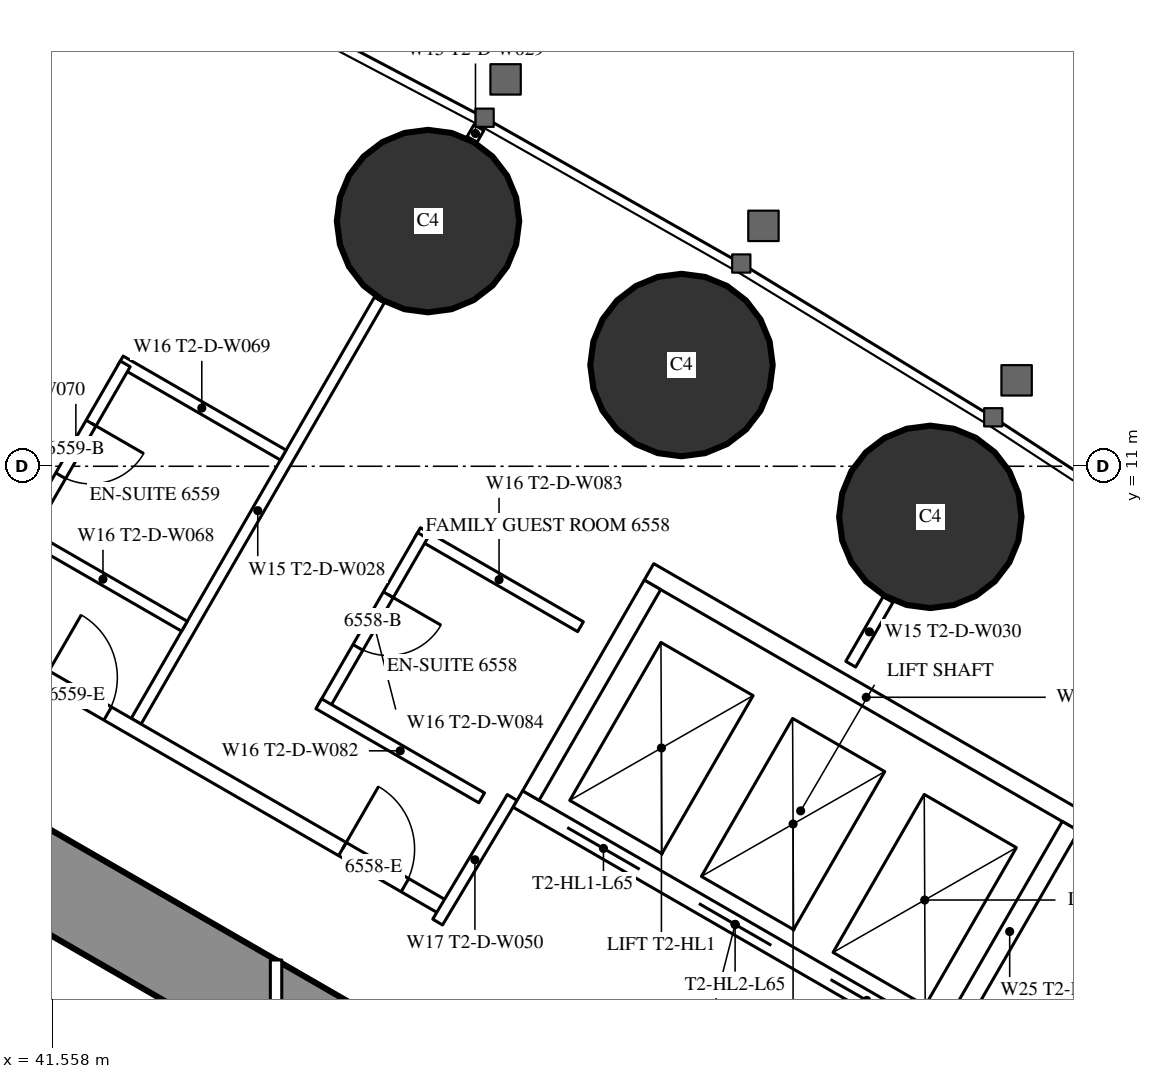
"""IFC4 building model, lengths in metres.
Left out: names, types, materials, properties, quantities, classifications, styles, units other than length and angle.
Written with IfcOpenShell. Run it as: python <this file> out.ifc"""

import sys

from ifc_helpers import new_model, si_unit, direction, frame, frame_2d, origin, origin_2d, place, context, subcontext, project, spatial, rectangle, circle, extrude, element, fill, save


model = new_model("IFC4")
c1 = context("Model", 3, precision=1e-05, world=origin(), true_north=direction((0.0, 1.0)))
c2 = subcontext(c1, "Body", "Model", "MODEL_VIEW")
j1 = project(units=[si_unit("LENGTHUNIT", "METRE"), si_unit("PLANEANGLEUNIT", "RADIAN")], contexts=[c1])
p1 = place(None, origin())
s1 = spatial("IfcSite", under=j1, at=p1, CompositionType="ELEMENT")
p2 = place(p1, origin())
s2 = spatial("IfcBuilding", under=s1, at=p2, CompositionType="ELEMENT")
p3 = place(p2, frame((0.0, 0.0, 244.1)))
s3 = spatial("IfcBuildingStorey", under=s2, at=p3, CompositionType="ELEMENT", Elevation=244.1)
for number, where, z_axis, x_axis in (
    (1, (53.108, 10.334, 0.0), (0.0, 0.0, 1.0), (1.0, 0.0, 0.0)),
    (2, (49.834, 12.332, 0.0), (0.0, 0.0, 1.0), (1.0, 0.0, 0.0)),
    (3, (46.499, 14.226, 0.0), (0.0, 0.0, 1.0), (1.0, 0.0, 0.0)),
):
    element("IfcColumn", number, at=place(p3, frame(where, z_axis=z_axis, x_axis=x_axis)), inside=s3, PredefinedType="COLUMN", context=c2, shape_type="SweptSolid", body=[
        extrude(circle(Radius=1.2, at=origin_2d()), origin(), (0.0, 0.0, 1.0), 3.6),
    ])
p4 = place(p3, frame((27.2, 13.8, 0.0), z_axis=(0.0, 0.0, 1.0), x_axis=(0.866024515034, -0.500001539357, 0.0)))
e4 = element("IfcWall", 4, at=p4, inside=s3, PredefinedType="SHEAR", context=c2, shape_type="SweptSolid", body=[
    extrude(rectangle(XDim=26.907, YDim=1.2, at=frame_2d((13.454, 0.0))), origin(), (0.0, 0.0, 1.0), 3.6),
])
p5 = place(p4, frame((4.6, 0.0, 0.0)))
e5 = element("IfcOpeningElement", 5, at=p5, cuts=e4, PredefinedType="OPENING", context=c2, shape_type="SweptSolid", body=[
    extrude(rectangle(XDim=1.0, YDim=2.2, at=frame_2d((0.5, 1.1))), frame((0.0, 0.61, 0.0), z_axis=(0.0, -1.0, 0.0), x_axis=(1.0, 0.0, 0.0)), (0.0, 0.0, 1.0), 1.22),
])
p6 = place(p4, frame((13.395, 0.0, 0.0)))
e6 = element("IfcOpeningElement", 6, at=p6, cuts=e4, PredefinedType="OPENING", context=c2, shape_type="SweptSolid", body=[
    extrude(rectangle(XDim=1.8, YDim=2.2, at=frame_2d((0.9, 1.1))), frame((0.0, 0.61, 0.0), z_axis=(0.0, -1.0, 0.0), x_axis=(1.0, 0.0, 0.0)), (0.0, 0.0, 1.0), 1.22),
])
p7 = place(p3, frame((42.66, 7.646, 0.0), z_axis=(0.0, 0.0, 1.0), x_axis=(0.499996592859, 0.866027370889, 0.0)))
e7 = element("IfcWall", 7, at=p7, inside=s3, PredefinedType="PARTITIONING", context=c2, shape_type="SweptSolid", body=[
    extrude(rectangle(XDim=6.398, YDim=0.15, at=frame_2d((3.199, 0.0))), origin(), (0.0, 0.0, 1.0), 2.45),
])
p8 = place(p3, frame((47.079, 15.3, 0.0), z_axis=(0.0, 0.0, 1.0), x_axis=(0.499212083968, 0.866479829667, 0.0)))
e8 = element("IfcWall", 8, at=p8, inside=s3, PredefinedType="PARTITIONING", context=c2, shape_type="SweptSolid", body=[
    extrude(rectangle(XDim=0.179, YDim=0.15, at=frame_2d((0.09, 0.0))), origin(), (0.0, 0.0, 1.0), 2.45),
])
p9 = place(p3, frame((52.06, 8.396, 0.0), z_axis=(0.0, 0.0, 1.0), x_axis=(0.500095379624, 0.865970329329, 0.0)))
e9 = element("IfcWall", 9, at=p9, inside=s3, PredefinedType="PARTITIONING", context=c2, shape_type="SweptSolid", body=[
    extrude(rectangle(XDim=0.982, YDim=0.15, at=frame_2d((0.491, 0.0))), origin(), (0.0, 0.0, 1.0), 3.35),
])
p10 = place(p3, frame((28.959, 15.44, 0.0), z_axis=(0.0, 0.0, 1.0), x_axis=(0.866028936079, -0.499993881836, 0.0)))
e10 = element("IfcWall", 10, at=p10, inside=s3, PredefinedType="PARTITIONING", context=c2, shape_type="SweptSolid", body=[
    extrude(rectangle(XDim=20.503, YDim=0.2, at=frame_2d((10.251, 0.0))), origin(), (0.0, 0.0, 1.0), 3.35),
])
p11 = place(p10, frame((18.953, 0.0, 0.0)))
e11 = element("IfcOpeningElement", 11, at=p11, cuts=e10, PredefinedType="OPENING", context=c2, shape_type="SweptSolid", body=[
    extrude(rectangle(XDim=0.95, YDim=2.2, at=frame_2d((0.475, 1.1))), frame((0.0, 0.11, 0.0), z_axis=(0.0, -1.0, 0.0), x_axis=(1.0, 0.0, 0.0)), (0.0, 0.0, 1.0), 0.22),
])
p12 = place(p10, frame((14.437, 0.0, 0.0)))
e12 = element("IfcOpeningElement", 12, at=p12, cuts=e10, PredefinedType="OPENING", context=c2, shape_type="SweptSolid", body=[
    extrude(rectangle(XDim=0.95, YDim=2.2, at=frame_2d((0.475, 1.1))), frame((0.0, 0.11, 0.0), z_axis=(0.0, -1.0, 0.0), x_axis=(1.0, 0.0, 0.0)), (0.0, 0.0, 1.0), 0.22),
])
p13 = place(p10, frame((2.244, 0.0, 0.0)))
e13 = element("IfcOpeningElement", 13, at=p13, cuts=e10, PredefinedType="OPENING", context=c2, shape_type="SweptSolid", body=[
    extrude(rectangle(XDim=1.8, YDim=2.04, at=frame_2d((0.9, 1.02))), frame((0.0, 0.11, 0.0), z_axis=(0.0, -1.0, 0.0), x_axis=(1.0, 0.0, 0.0)), (0.0, 0.0, 1.0), 0.22),
])
p14 = place(p3, frame((47.606, 6.642, 0.0), z_axis=(0.0, 0.0, 1.0), x_axis=(-0.51353662755, -0.858067673418, 0.0)))
e14 = element("IfcWall", 14, at=p14, inside=s3, PredefinedType="PARTITIONING", context=c2, shape_type="SweptSolid", body=[
    extrude(rectangle(XDim=1.91, YDim=0.15, at=frame_2d((0.955, 0.0))), origin(), (0.0, 0.0, 1.0), 3.35),
])
p15 = place(p3, frame((46.362, 10.127, 0.0), z_axis=(0.0, 0.0, 1.0), x_axis=(0.866006523861, -0.500032699561, 0.0)))
e15 = element("IfcWall", 15, at=p15, inside=s3, PredefinedType="PARTITIONING", context=c2, shape_type="SweptSolid", body=[
    extrude(rectangle(XDim=2.475, YDim=0.15, at=frame_2d((1.237, 0.0))), origin(), (0.0, 0.0, 1.0), 3.35),
])
p16 = place(p3, frame((45.127, 7.838, 0.0), z_axis=(0.0, 0.0, 1.0), x_axis=(0.500006934395, 0.866021400173, 0.0)))
e16 = element("IfcWall", 16, at=p16, inside=s3, PredefinedType="PARTITIONING", context=c2, shape_type="SweptSolid", body=[
    extrude(rectangle(XDim=2.6, YDim=0.15, at=frame_2d((1.3, 0.0))), origin(), (0.0, 0.0, 1.0), 3.35),
])
p17 = place(p16, frame((0.9, 0.0, 0.0)))
e17 = element("IfcOpeningElement", 17, at=p17, cuts=e16, PredefinedType="OPENING", context=c2, shape_type="SweptSolid", body=[
    extrude(rectangle(XDim=0.8, YDim=2.2, at=frame_2d((0.4, 1.1))), frame((0.0, 0.085, 0.0), z_axis=(0.0, -1.0, 0.0), x_axis=(1.0, 0.0, 0.0)), (0.0, 0.0, 1.0), 0.17),
])
p18 = place(p3, frame((45.062, 7.875, 0.0), z_axis=(0.0, 0.0, 1.0), x_axis=(0.866031185235, -0.4999899861, 0.0)))
e18 = element("IfcWall", 18, at=p18, inside=s3, PredefinedType="PARTITIONING", context=c2, shape_type="SweptSolid", body=[
    extrude(rectangle(XDim=2.475, YDim=0.15, at=frame_2d((1.238, 0.0))), origin(), (0.0, 0.0, 1.0), 2.5),
])
p19 = place(p3, frame((42.451, 12.385, 0.0), z_axis=(0.0, 0.0, 1.0), x_axis=(0.866031185235, -0.4999899861, 0.0)))
e19 = element("IfcWall", 19, at=p19, inside=s3, PredefinedType="PARTITIONING", context=c2, shape_type="SweptSolid", body=[
    extrude(rectangle(XDim=2.475, YDim=0.15, at=frame_2d((1.238, 0.0))), origin(), (0.0, 0.0, 1.0), 3.35),
])
p20 = place(p3, frame((41.216, 10.095, 0.0), z_axis=(0.0, 0.0, 1.0), x_axis=(0.499936506574, 0.866062058628, 0.0)))
e20 = element("IfcWall", 20, at=p20, inside=s3, PredefinedType="PARTITIONING", context=c2, shape_type="SweptSolid", body=[
    extrude(rectangle(XDim=2.6, YDim=0.15, at=frame_2d((1.3, 0.0))), origin(), (0.0, 0.0, 1.0), 3.35),
])
p21 = place(p20, frame((0.9, 0.0, 0.0)))
e21 = element("IfcOpeningElement", 21, at=p21, cuts=e20, PredefinedType="OPENING", context=c2, shape_type="SweptSolid", body=[
    extrude(rectangle(XDim=0.8, YDim=2.2, at=frame_2d((0.4, 1.1))), frame((0.0, 0.085, 0.0), z_axis=(0.0, -1.0, 0.0), x_axis=(1.0, 0.0, 0.0)), (0.0, 0.0, 1.0), 0.17),
])
p22 = place(p3, frame((41.151, 10.133, 0.0), z_axis=(0.0, 0.0, 1.0), x_axis=(0.866006523861, -0.500032699561, 0.0)))
e22 = element("IfcWall", 22, at=p22, inside=s3, PredefinedType="PARTITIONING", context=c2, shape_type="SweptSolid", body=[
    extrude(rectangle(XDim=2.475, YDim=0.15, at=frame_2d((1.237, 0.0))), origin(), (0.0, 0.0, 1.0), 2.5),
])
p23 = place(p3, frame((44.5, -4.505, 0.0), z_axis=(0.0, 0.0, 1.0), x_axis=(0.0, 1.0, 0.0)))
e23 = element("IfcWall", 23, at=p23, inside=s3, PredefinedType="PARTITIONING", context=c2, shape_type="SweptSolid", body=[
    extrude(rectangle(XDim=9.009, YDim=0.15, at=frame_2d((4.505, 0.0))), origin(), (0.0, 0.0, 1.0), 3.35),
])
p24 = place(p23, frame((1.752, 0.0, 0.0)))
e24 = element("IfcOpeningElement", 24, at=p24, cuts=e23, PredefinedType="OPENING", context=c2, shape_type="SweptSolid", body=[
    extrude(rectangle(XDim=1.0, YDim=2.2, at=frame_2d((0.5, 1.1))), frame((0.0, 0.085, 0.0), z_axis=(0.0, -1.0, 0.0), x_axis=(1.0, 0.0, 0.0)), (0.0, 0.0, 1.0), 0.17),
])
p25 = place(p23, frame((6.257, 0.0, 0.0)))
e25 = element("IfcOpeningElement", 25, at=p25, cuts=e23, PredefinedType="OPENING", context=c2, shape_type="SweptSolid", body=[
    extrude(rectangle(XDim=1.0, YDim=2.2, at=frame_2d((0.5, 1.1))), frame((0.0, 0.085, 0.0), z_axis=(0.0, -1.0, 0.0), x_axis=(1.0, 0.0, 0.0)), (0.0, 0.0, 1.0), 0.17),
])
p26 = place(p3, frame((47.681, 6.622, 0.0), z_axis=(0.0, 0.0, 1.0), x_axis=(0.86603344179, -0.499986077507, 0.0)))
e26 = element("IfcWall", 26, at=p26, inside=s3, PredefinedType="PARTITIONING", context=c2, shape_type="SweptSolid", body=[
    extrude(rectangle(XDim=6.6, YDim=0.25, at=frame_2d((3.3, 0.0))), origin(), (0.0, 0.0, 1.0), 3.35),
])
p27 = place(p26, frame((0.75, 0.0, 0.0)))
e27 = element("IfcOpeningElement", 27, at=p27, cuts=e26, PredefinedType="OPENING", context=c2, shape_type="SweptSolid", body=[
    extrude(rectangle(XDim=1.1, YDim=2.2, at=frame_2d((0.55, 1.1))), frame((0.0, 0.135, 0.0), z_axis=(0.0, -1.0, 0.0), x_axis=(1.0, 0.0, 0.0)), (0.0, 0.0, 1.0), 0.27),
])
p28 = place(p26, frame((2.75, 0.0, 0.0)))
e28 = element("IfcOpeningElement", 28, at=p28, cuts=e26, PredefinedType="OPENING", context=c2, shape_type="SweptSolid", body=[
    extrude(rectangle(XDim=1.1, YDim=2.2, at=frame_2d((0.55, 1.1))), frame((0.0, 0.135, 0.0), z_axis=(0.0, -1.0, 0.0), x_axis=(1.0, 0.0, 0.0)), (0.0, 0.0, 1.0), 0.27),
])
p29 = place(p26, frame((4.75, 0.0, 0.0)))
e29 = element("IfcOpeningElement", 29, at=p29, cuts=e26, PredefinedType="OPENING", context=c2, shape_type="SweptSolid", body=[
    extrude(rectangle(XDim=1.1, YDim=2.2, at=frame_2d((0.55, 1.1))), frame((0.0, 0.135, 0.0), z_axis=(0.0, -1.0, 0.0), x_axis=(1.0, 0.0, 0.0)), (0.0, 0.0, 1.0), 0.27),
])
p30 = place(p3, frame((49.406, 9.611, 0.0), z_axis=(0.0, 0.0, 1.0), x_axis=(0.86603344179, -0.499986077507, 0.0)))
e30 = element("IfcWall", 30, at=p30, inside=s3, PredefinedType="PARTITIONING", context=c2, shape_type="SweptSolid", body=[
    extrude(rectangle(XDim=6.6, YDim=0.25, at=frame_2d((3.3, 0.0))), origin(), (0.0, 0.0, 1.0), 3.35),
])
p31 = place(p3, frame((47.852, 6.668, 0.0), z_axis=(0.0, 0.0, 1.0), x_axis=(0.499929347863, 0.866066190972, 0.0)))
e31 = element("IfcWall", 31, at=p31, inside=s3, PredefinedType="PARTITIONING", context=c2, shape_type="SweptSolid", body=[
    extrude(rectangle(XDim=3.201, YDim=0.25, at=frame_2d((1.6, 0.0))), origin(), (0.0, 0.0, 1.0), 3.35),
])
p32 = place(p3, frame((53.352, 3.493, 0.0), z_axis=(0.0, 0.0, 1.0), x_axis=(0.499872130319, 0.866099216793, 0.0)))
e32 = element("IfcWall", 32, at=p32, inside=s3, PredefinedType="PARTITIONING", context=c2, shape_type="SweptSolid", body=[
    extrude(rectangle(XDim=3.2, YDim=0.25, at=frame_2d((1.6, 0.0))), origin(), (0.0, 0.0, 1.0), 3.35),
])
p33 = place(p17, origin())
e33 = element("IfcDoor", 33, at=p33, inside=s3, OperationType="SINGLE_SWING_RIGHT", PredefinedType="DOOR", context=c2, shape_type="SweptSolid", body=[
    extrude(rectangle(XDim=0.8, YDim=2.2, at=frame_2d((0.4, 1.1))), frame((0.0, 0.025, 0.0), z_axis=(0.0, -1.0, 0.0), x_axis=(1.0, 0.0, 0.0)), (0.0, 0.0, 1.0), 0.05),
])
fill(e17, e33)
p34 = place(p11, origin())
e34 = element("IfcDoor", 34, at=p34, inside=s3, OperationType="SINGLE_SWING_LEFT", PredefinedType="DOOR", context=c2, shape_type="SweptSolid", body=[
    extrude(rectangle(XDim=0.95, YDim=2.2, at=frame_2d((0.475, 1.1))), frame((0.0, 0.025, 0.0), z_axis=(0.0, -1.0, 0.0), x_axis=(1.0, 0.0, 0.0)), (0.0, 0.0, 1.0), 0.05),
])
fill(e11, e34)
p35 = place(p21, origin())
e35 = element("IfcDoor", 35, at=p35, inside=s3, OperationType="SINGLE_SWING_RIGHT", PredefinedType="DOOR", context=c2, shape_type="SweptSolid", body=[
    extrude(rectangle(XDim=0.8, YDim=2.2, at=frame_2d((0.4, 1.1))), frame((0.0, 0.025, 0.0), z_axis=(0.0, -1.0, 0.0), x_axis=(1.0, 0.0, 0.0)), (0.0, 0.0, 1.0), 0.05),
])
fill(e21, e35)
p36 = place(p12, origin())
e36 = element("IfcDoor", 36, at=p36, inside=s3, OperationType="SINGLE_SWING_LEFT", PredefinedType="DOOR", context=c2, shape_type="SweptSolid", body=[
    extrude(rectangle(XDim=0.95, YDim=2.2, at=frame_2d((0.475, 1.1))), frame((0.0, 0.025, 0.0), z_axis=(0.0, -1.0, 0.0), x_axis=(1.0, 0.0, 0.0)), (0.0, 0.0, 1.0), 0.05),
])
fill(e12, e36)
p37 = place(p27, origin())
e37 = element("IfcDoor", 37, at=p37, inside=s3, OperationType="DOUBLE_DOOR_SLIDING", PredefinedType="USERDEFINED", context=c2, shape_type="SweptSolid", body=[
    extrude(rectangle(XDim=1.1, YDim=2.2, at=frame_2d((0.55, 1.1))), frame((0.0, 0.025, 0.0), z_axis=(0.0, -1.0, 0.0), x_axis=(1.0, 0.0, 0.0)), (0.0, 0.0, 1.0), 0.05),
])
fill(e27, e37)
p38 = place(p28, origin())
e38 = element("IfcDoor", 38, at=p38, inside=s3, OperationType="DOUBLE_DOOR_SLIDING", PredefinedType="USERDEFINED", context=c2, shape_type="SweptSolid", body=[
    extrude(rectangle(XDim=1.1, YDim=2.2, at=frame_2d((0.55, 1.1))), frame((0.0, 0.025, 0.0), z_axis=(0.0, -1.0, 0.0), x_axis=(1.0, 0.0, 0.0)), (0.0, 0.0, 1.0), 0.05),
])
fill(e28, e38)
p39 = place(p29, origin())
e39 = element("IfcDoor", 39, at=p39, inside=s3, OperationType="DOUBLE_DOOR_SLIDING", PredefinedType="USERDEFINED", context=c2, shape_type="SweptSolid", body=[
    extrude(rectangle(XDim=1.1, YDim=2.2, at=frame_2d((0.55, 1.1))), frame((0.0, 0.025, 0.0), z_axis=(0.0, -1.0, 0.0), x_axis=(1.0, 0.0, 0.0)), (0.0, 0.0, 1.0), 0.05),
])
fill(e29, e39)
save(model, sys.argv[1])
